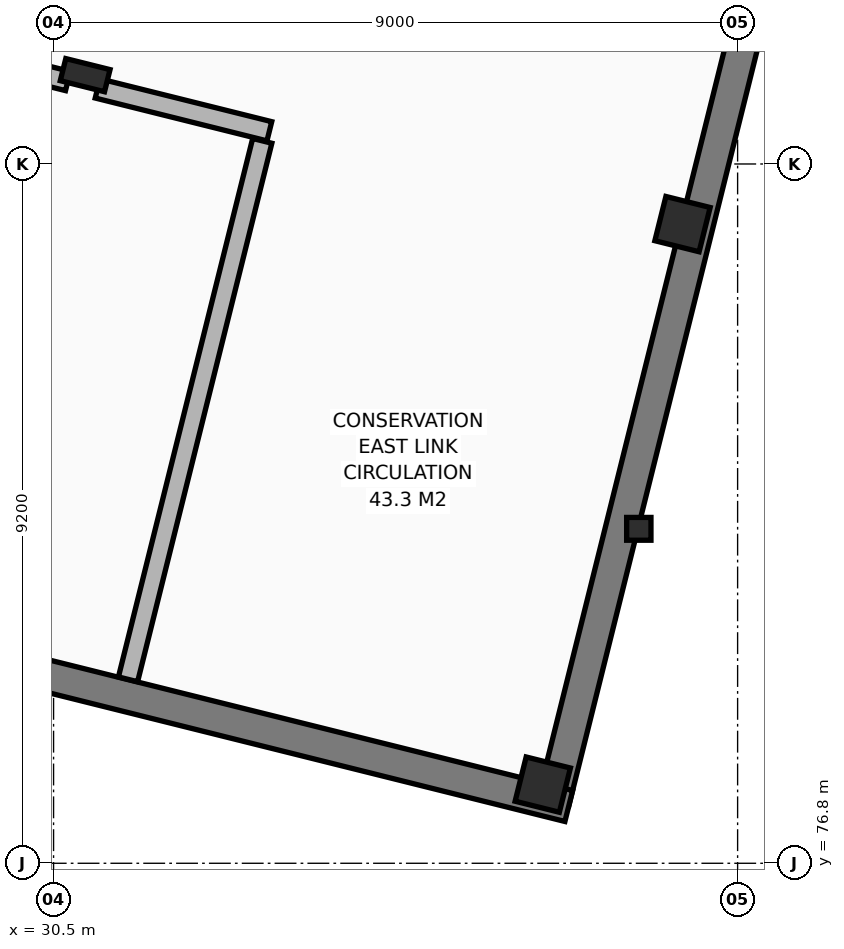
"""IFC4 building model, lengths in metres.
Left out: names, types, materials, properties, quantities, classifications, styles, units other than length and angle.
Written with IfcOpenShell. Run it as: python <this file> out.ifc"""

import sys

from ifc_helpers import new_model, si_unit, direction, frame, frame_2d, origin, origin_2d, place, context, subcontext, project, spatial, rectangle, i_section, extrude, element, save


model = new_model("IFC4")
c1 = context("Model", 3, precision=1e-05, world=origin(), true_north=direction((0.0, 1.0)))
c2 = subcontext(c1, "Body", "Model", "MODEL_VIEW")
j1 = project(units=[si_unit("LENGTHUNIT", "METRE"), si_unit("PLANEANGLEUNIT", "RADIAN")], contexts=[c1])
p1 = place(None, origin())
s1 = spatial("IfcSite", under=j1, at=p1, CompositionType="ELEMENT")
p2 = place(p1, origin())
s2 = spatial("IfcBuilding", under=s1, at=p2, CompositionType="ELEMENT")
p3 = place(p2, frame((0.0, 0.0, -4.8)))
s3 = spatial("IfcBuildingStorey", under=s2, at=p3, CompositionType="ELEMENT", Elevation=-4.8)
p4 = place(p3, frame((30.916, 87.169, 0.0), z_axis=(0.0, 0.0, 1.0), x_axis=(0.970295726276, -0.2419218956, 0.0)))
e1 = element("IfcColumn", 1, at=p4, inside=s3, PredefinedType="COLUMN", context=c2, shape_type="SweptSolid", body=[
    extrude(i_section(OverallWidth=0.3, OverallDepth=0.6, WebThickness=0.015, FlangeThickness=0.03, FilletRadius=0.027, at=origin_2d()), origin(), (0.0, 0.0, 1.0), 4.8),
])
for number, where, z_axis, x_axis in (
    (2, (36.936, 77.835, 0.0), (0.0, 0.0, 1.0), (0.97, -0.242, 0.0)),
    (3, (38.775, 85.209, 0.0), (0.0, 0.0, 1.0), (0.97, -0.242, 0.0)),
):
    element("IfcColumn", number, at=place(p3, frame(where, z_axis=z_axis, x_axis=x_axis)), inside=s3, PredefinedType="COLUMN", context=c2, shape_type="SweptSolid", body=[
        extrude(rectangle(XDim=0.6, YDim=0.6, at=origin_2d()), origin(), (0.0, 0.0, 1.0), 4.8),
    ])
p5 = place(p3, frame((38.2, 81.2, 0.0), z_axis=(0.0, 0.0, 1.0), x_axis=(1.0, 0.0, 0.0)))
e4 = element("IfcColumn", 4, at=p5, inside=s3, PredefinedType="COLUMN", context=c2, shape_type="SweptSolid", body=[
    extrude(i_section(OverallWidth=0.3, OverallDepth=0.32, WebThickness=0.011, FlangeThickness=0.021, FilletRadius=0.027, at=origin_2d()), origin(), (0.0, 0.0, 1.0), 4.8),
])
p6 = place(p3, frame((42.588, 99.718, 0.0), z_axis=(0.0, 0.0, 1.0), x_axis=(-0.241923066972, -0.970295434219, 0.0)))
e5 = element("IfcWall", 5, at=p6, inside=s3, PredefinedType="USERDEFINED", context=c2, shape_type="SweptSolid", body=[
    extrude(rectangle(XDim=22.79, YDim=0.42, at=frame_2d((11.395, 0.0))), origin(), (0.0, 0.0, 1.0), 4.55),
])
p7 = place(p3, frame((37.279, 77.554, 0.0), z_axis=(0.0, 0.0, 1.0), x_axis=(-0.970295598121, 0.241922409599, 0.0)))
e6 = element("IfcWall", 6, at=p7, inside=s3, PredefinedType="USERDEFINED", context=c2, shape_type="SweptSolid", body=[
    extrude(rectangle(XDim=32.79, YDim=0.42, at=frame_2d((16.395, 0.0))), origin(), (0.0, 0.0, 1.0), 4.55),
])
p8 = place(p3, frame((30.689, 87.091, 0.0), z_axis=(0.0, 0.0, 1.0), x_axis=(-0.970295427473, 0.241923094029, 0.0)))
e7 = element("IfcWall", 7, at=p8, inside=s3, PredefinedType="PARTITIONING", context=c2, shape_type="SweptSolid", body=[
    extrude(rectangle(XDim=7.597, YDim=0.26, at=frame_2d((3.798, 0.0))), origin(), (0.0, 0.0, 1.0), 4.04),
])
p9 = place(p3, frame((33.339, 86.43, 0.0), z_axis=(0.0, 0.0, 1.0), x_axis=(-0.970308784597, 0.241869515512, 0.0)))
e8 = element("IfcWall", 8, at=p9, inside=s3, PredefinedType="PARTITIONING", context=c2, shape_type="SweptSolid", body=[
    extrude(rectangle(XDim=2.329, YDim=0.26, at=frame_2d((1.164, 0.0))), origin(), (0.0, 0.0, 1.0), 4.04),
])
p10 = place(p3, frame((31.479, 79.22, 0.0), z_axis=(0.0, 0.0, 1.0), x_axis=(0.241906112163, 0.970299661392, 0.0)))
e9 = element("IfcWall", 9, at=p10, inside=s3, PredefinedType="PARTITIONING", context=c2, shape_type="SweptSolid", body=[
    extrude(rectangle(XDim=7.301, YDim=0.26, at=frame_2d((3.65, 0.0))), origin(), (0.0, 0.0, 1.0), 4.04),
])
save(model, sys.argv[1])
